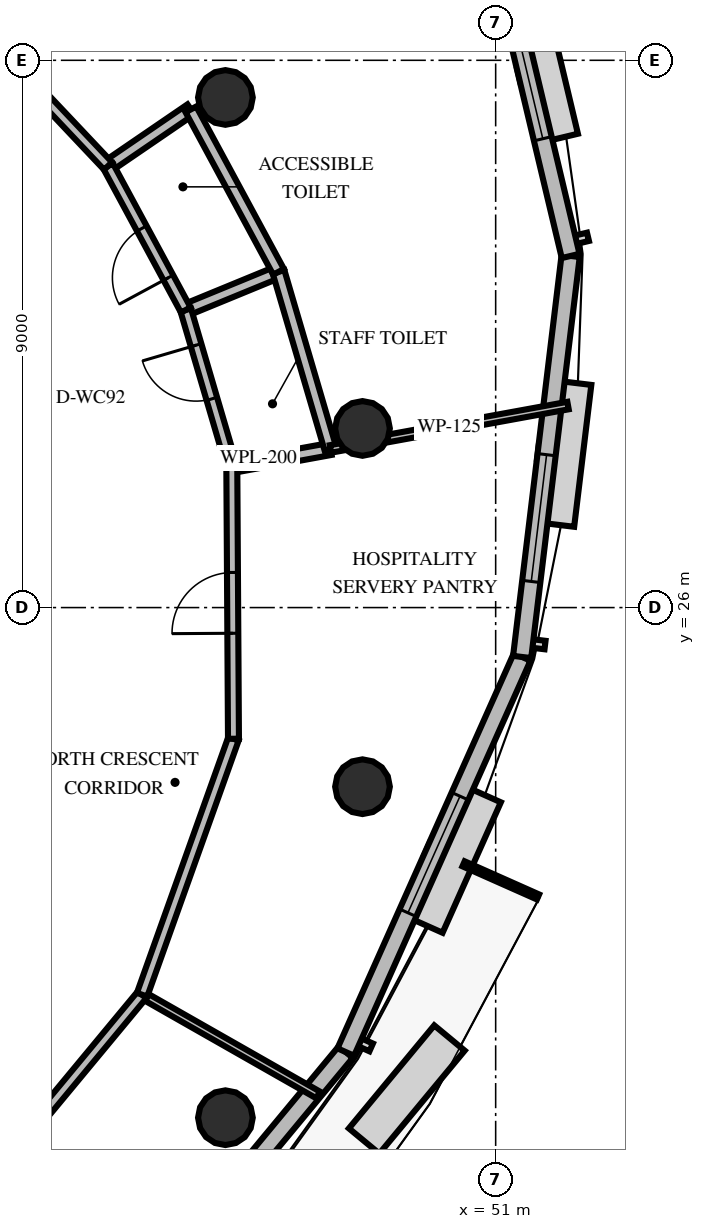
"""IFC4 building model, lengths in metres.
Left out: names, types, materials, properties, quantities, classifications, styles, units other than length and angle.
Written with IfcOpenShell. Run it as: python <this file> out.ifc"""

import sys

from ifc_helpers import new_model, si_unit, direction, frame, frame_2d, origin, origin_2d, place, context, subcontext, project, spatial, rectangle, circle, extrude, element, fill, save


model = new_model("IFC4")
c1 = context("Model", 3, precision=1e-05, world=origin(), true_north=direction((0.0, 1.0)))
c2 = subcontext(c1, "Body", "Model", "MODEL_VIEW")
j1 = project(units=[si_unit("LENGTHUNIT", "METRE"), si_unit("PLANEANGLEUNIT", "RADIAN")], contexts=[c1])
p1 = place(None, origin())
s1 = spatial("IfcSite", under=j1, at=p1, CompositionType="ELEMENT")
p2 = place(p1, origin())
s2 = spatial("IfcBuilding", under=s1, at=p2, CompositionType="ELEMENT")
p3 = place(p2, frame((0.0, 0.0, 241.2)))
s3 = spatial("IfcBuildingStorey", under=s2, at=p3, CompositionType="ELEMENT", Elevation=241.2)
for number, where, z_axis, x_axis in (
    (1, (48.81, 28.946, 0.0), (0.0, 0.0, 1.0), (1.0, 0.0, 0.0)),
    (2, (46.555, 34.389, 0.0), (0.0, 0.0, 1.0), (1.0, 0.0, 0.0)),
    (3, (46.555, 17.611, 0.0), (0.0, 0.0, 1.0), (1.0, 0.0, 0.0)),
    (4, (48.81, 23.054, 0.0), (0.0, 0.0, 1.0), (1.0, 0.0, 0.0)),
):
    element("IfcColumn", number, at=place(p3, frame(where, z_axis=z_axis, x_axis=x_axis)), inside=s3, PredefinedType="COLUMN", context=c2, shape_type="SweptSolid", body=[
        extrude(circle(Radius=0.45, at=origin_2d()), origin(), (0.0, 0.0, 1.0), 3.6),
    ])
p4 = place(p3, frame((43.881, 13.075, 0.0), z_axis=(0.0, 0.0, 1.0), x_axis=(0.638097821835, 0.769955303748, 0.0)))
e5 = element("IfcWall", 5, at=p4, inside=s3, PredefinedType="SOLIDWALL", context=c2, shape_type="SweptSolid", body=[
    extrude(rectangle(XDim=7.293, YDim=0.3, at=frame_2d((3.646, 0.0))), origin(), (0.0, 0.0, 1.0), 2.76),
])
p5 = place(p4, frame((1.63, 0.0, 0.0)))
e6 = element("IfcOpeningElement", 6, at=p5, cuts=e5, PredefinedType="OPENING", context=c2, shape_type="SweptSolid", body=[
    extrude(rectangle(XDim=1.05, YDim=2.15, at=frame_2d((0.525, 1.075))), frame((0.0, 0.16, 0.0), z_axis=(0.0, -1.0, 0.0), x_axis=(1.0, 0.0, 0.0)), (0.0, 0.0, 1.0), 0.32),
])
p6 = place(p3, frame((48.535, 18.69, 0.0), z_axis=(0.0, 0.0, 1.0), x_axis=(0.407669232849, 0.913129671289, 0.0)))
e7 = element("IfcWall", 7, at=p6, inside=s3, PredefinedType="SOLIDWALL", context=c2, shape_type="SweptSolid", body=[
    extrude(rectangle(XDim=7.115, YDim=0.3, at=frame_2d((3.558, 0.0))), origin(), (0.0, 0.0, 1.0), 2.76),
])
p7 = place(p6, frame((2.508, 0.0, 0.8)))
e8 = element("IfcOpeningElement", 8, at=p7, cuts=e7, PredefinedType="OPENING", context=c2, shape_type="SweptSolid", body=[
    extrude(rectangle(XDim=2.1, YDim=1.85, at=frame_2d((1.05, 0.925))), frame((0.0, 0.16, 0.0), z_axis=(0.0, -1.0, 0.0), x_axis=(1.0, 0.0, 0.0)), (0.0, 0.0, 1.0), 0.32),
])
p8 = place(p3, frame((51.436, 25.188, 0.0), z_axis=(0.0, 0.0, 1.0), x_axis=(0.120062472336, 0.992766338439, 0.0)))
e9 = element("IfcWall", 9, at=p8, inside=s3, PredefinedType="SOLIDWALL", context=c2, shape_type="SweptSolid", body=[
    extrude(rectangle(XDim=6.643, YDim=0.3, at=frame_2d((3.322, 0.0))), origin(), (0.0, 0.0, 1.0), 2.76),
])
p9 = place(p8, frame((1.251, 0.0, 0.8)))
e10 = element("IfcOpeningElement", 10, at=p9, cuts=e9, PredefinedType="OPENING", context=c2, shape_type="SweptSolid", body=[
    extrude(rectangle(XDim=2.1, YDim=1.85, at=frame_2d((1.05, 0.925))), frame((0.0, 0.16, 0.0), z_axis=(0.0, -1.0, 0.0), x_axis=(1.0, 0.0, 0.0)), (0.0, 0.0, 1.0), 0.32),
])
p10 = place(p3, frame((52.233, 31.783, 0.0), z_axis=(0.0, 0.0, 1.0), x_axis=(-0.23117584111, 0.972911984964, 0.0)))
e11 = element("IfcWall", 11, at=p10, inside=s3, PredefinedType="SOLIDWALL", context=c2, shape_type="SweptSolid", body=[
    extrude(rectangle(XDim=6.062, YDim=0.3, at=frame_2d((3.031, 0.0))), origin(), (0.0, 0.0, 1.0), 2.76),
])
p11 = place(p10, frame((1.981, 0.0, 0.8)))
e12 = element("IfcOpeningElement", 12, at=p11, cuts=e11, PredefinedType="OPENING", context=c2, shape_type="SweptSolid", body=[
    extrude(rectangle(XDim=2.1, YDim=1.85, at=frame_2d((1.05, 0.925))), frame((0.0, 0.16, 0.0), z_axis=(0.0, -1.0, 0.0), x_axis=(1.0, 0.0, 0.0)), (0.0, 0.0, 1.0), 0.32),
])
for number, where, z_axis, x_axis in (
    (13, (46.661, 28.312, 0.0), (0.0, 0.0, 1.0), (0.984, 0.18, 0.0)),
    (14, (45.903, 30.894, 0.0), (0.0, 0.0, 1.0), (0.925, 0.38, 0.0)),
):
    element("IfcWall", number, at=place(p3, frame(where, z_axis=z_axis, x_axis=x_axis)), inside=s3, PredefinedType="PLUMBINGWALL", context=c2, shape_type="SweptSolid", body=[
        extrude(rectangle(XDim=1.65, YDim=0.2, at=frame_2d((0.825, 0.0))), origin(), (0.0, 0.0, 1.0), 2.46),
    ])
p12 = place(p3, frame((48.284, 28.609, 0.0), z_axis=(0.0, 0.0, 1.0), x_axis=(-0.281491340898, 0.959563768073, 0.0)))
e15 = element("IfcWall", 15, at=p12, inside=s3, PredefinedType="PLUMBINGWALL", context=c2, shape_type="SweptSolid", body=[
    extrude(rectangle(XDim=3.036, YDim=0.2, at=frame_2d((1.518, 0.0))), origin(), (0.0, 0.0, 1.0), 2.46),
])
p13 = place(p3, frame((46.661, 28.312, 0.0), z_axis=(0.0, 0.0, 1.0), x_axis=(-0.281473567951, 0.95956898165, 0.0)))
e16 = element("IfcWall", 16, at=p13, inside=s3, PredefinedType="PARTITIONING", context=c2, shape_type="SweptSolid", body=[
    extrude(rectangle(XDim=2.691, YDim=0.18, at=frame_2d((1.345, 0.0))), origin(), (0.0, 0.0, 1.0), 2.46),
])
p14 = place(p13, frame((1.167, 0.0, 0.0)))
e17 = element("IfcOpeningElement", 17, at=p14, cuts=e16, PredefinedType="OPENING", context=c2, shape_type="SweptSolid", body=[
    extrude(rectangle(XDim=0.92, YDim=2.1, at=frame_2d((0.46, 1.05))), frame((0.0, 0.1, 0.0), z_axis=(0.0, -1.0, 0.0), x_axis=(1.0, 0.0, 0.0)), (0.0, 0.0, 1.0), 0.2),
])
p15 = place(p3, frame((44.625, 33.262, 0.0), z_axis=(0.0, 0.0, 1.0), x_axis=(0.825644641501, 0.564190505026, 0.0)))
e18 = element("IfcWall", 18, at=p15, inside=s3, PredefinedType="PLUMBINGWALL", context=c2, shape_type="SweptSolid", body=[
    extrude(rectangle(XDim=1.65, YDim=0.2, at=frame_2d((0.825, 0.0))), origin(), (0.0, 0.0, 1.0), 2.46),
])
p16 = place(p3, frame((47.429, 31.521, 0.0), z_axis=(0.0, 0.0, 1.0), x_axis=(-0.474857458355, 0.880062721768, 0.0)))
e19 = element("IfcWall", 19, at=p16, inside=s3, PredefinedType="PLUMBINGWALL", context=c2, shape_type="SweptSolid", body=[
    extrude(rectangle(XDim=3.035, YDim=0.2, at=frame_2d((1.518, 0.0))), origin(), (0.0, 0.0, 1.0), 2.46),
])
p17 = place(p3, frame((45.903, 30.894, 0.0), z_axis=(0.0, 0.0, 1.0), x_axis=(-0.474905831931, 0.88003661901, 0.0)))
e20 = element("IfcWall", 20, at=p17, inside=s3, PredefinedType="PARTITIONING", context=c2, shape_type="SweptSolid", body=[
    extrude(rectangle(XDim=2.691, YDim=0.18, at=frame_2d((1.345, 0.0))), origin(), (0.0, 0.0, 1.0), 2.46),
])
p18 = place(p17, frame((0.603, 0.0, 0.0)))
e21 = element("IfcOpeningElement", 21, at=p18, cuts=e20, PredefinedType="OPENING", context=c2, shape_type="SweptSolid", body=[
    extrude(rectangle(XDim=0.92, YDim=2.1, at=frame_2d((0.46, 1.05))), frame((0.0, 0.1, 0.0), z_axis=(0.0, -1.0, 0.0), x_axis=(1.0, 0.0, 0.0)), (0.0, 0.0, 1.0), 0.2),
])
p19 = place(p3, frame((48.284, 28.609, 0.0), z_axis=(0.0, 0.0, 1.0), x_axis=(0.98373190469, 0.179642811418, 0.0)))
e22 = element("IfcWall", 22, at=p19, inside=s3, PredefinedType="PARTITIONING", context=c2, shape_type="SweptSolid", body=[
    extrude(rectangle(XDim=3.971, YDim=0.125, at=frame_2d((1.986, 0.0))), origin(), (0.0, 0.0, 1.0), 2.46),
])
p20 = place(p3, frame((44.625, 33.262, 0.0), z_axis=(0.0, 0.0, 1.0), x_axis=(-0.686440124719, 0.727186327688, 0.0)))
e23 = element("IfcWall", 23, at=p20, inside=s3, PredefinedType="PARTITIONING", context=c2, shape_type="SweptSolid", body=[
    extrude(rectangle(XDim=4.026, YDim=0.18, at=frame_2d((2.013, 0.0))), origin(), (0.0, 0.0, 1.0), 2.46),
])
p21 = place(p20, frame((2.195, 0.0, 0.0)))
e24 = element("IfcOpeningElement", 24, at=p21, cuts=e23, PredefinedType="OPENING", context=c2, shape_type="SweptSolid", body=[
    extrude(rectangle(XDim=1.0, YDim=2.15, at=frame_2d((0.5, 1.075))), frame((0.0, 0.1, 0.0), z_axis=(0.0, -1.0, 0.0), x_axis=(1.0, 0.0, 0.0)), (0.0, 0.0, 1.0), 0.2),
])
p22 = place(p3, frame((45.185, 19.633, 0.0), z_axis=(0.0, 0.0, 1.0), x_axis=(0.86904485461, -0.494733302574, 0.0)))
e25 = element("IfcWall", 25, at=p22, inside=s3, PredefinedType="PARTITIONING", context=c2, shape_type="SweptSolid", body=[
    extrude(rectangle(XDim=3.331, YDim=0.125, at=frame_2d((1.666, 0.0))), origin(), (0.0, 0.0, 1.0), 2.46),
])
p23 = place(p3, frame((42.333, 16.192, 0.0), z_axis=(0.0, 0.0, 1.0), x_axis=(0.638070606168, 0.769977857828, 0.0)))
e26 = element("IfcWall", 26, at=p23, inside=s3, PredefinedType="PARTITIONING", context=c2, shape_type="SweptSolid", body=[
    extrude(rectangle(XDim=4.47, YDim=0.18, at=frame_2d((2.235, 0.0))), origin(), (0.0, 0.0, 1.0), 2.46),
])
p24 = place(p3, frame((45.185, 19.633, 0.0), z_axis=(0.0, 0.0, 1.0), x_axis=(0.336312175041, 0.941750561943, 0.0)))
e27 = element("IfcWall", 27, at=p24, inside=s3, PredefinedType="PARTITIONING", context=c2, shape_type="SweptSolid", body=[
    extrude(rectangle(XDim=4.469, YDim=0.18, at=frame_2d((2.235, 0.0))), origin(), (0.0, 0.0, 1.0), 2.46),
])
p25 = place(p3, frame((46.688, 23.843, 0.0), z_axis=(0.0, 0.0, 1.0), x_axis=(-0.006117429774, 0.999981288351, 0.0)))
e28 = element("IfcWall", 28, at=p25, inside=s3, PredefinedType="PARTITIONING", context=c2, shape_type="SweptSolid", body=[
    extrude(rectangle(XDim=4.47, YDim=0.18, at=frame_2d((2.235, 0.0))), origin(), (0.0, 0.0, 1.0), 2.46),
])
p26 = place(p25, frame((1.735, 0.0, 0.0)))
e29 = element("IfcOpeningElement", 29, at=p26, cuts=e28, PredefinedType="OPENING", context=c2, shape_type="SweptSolid", body=[
    extrude(rectangle(XDim=1.0, YDim=2.15, at=frame_2d((0.5, 1.075))), frame((0.0, 0.1, 0.0), z_axis=(0.0, -1.0, 0.0), x_axis=(1.0, 0.0, 0.0)), (0.0, 0.0, 1.0), 0.2),
])
p27 = place(p7, origin())
e30 = element("IfcWindow", 30, at=p27, inside=s3, PartitioningType="SINGLE_PANEL", PredefinedType="WINDOW", context=c2, shape_type="SweptSolid", body=[
    extrude(rectangle(XDim=2.1, YDim=1.85, at=frame_2d((1.05, 0.925))), frame((0.0, 0.03, 0.0), z_axis=(0.0, -1.0, 0.0), x_axis=(1.0, 0.0, 0.0)), (0.0, 0.0, 1.0), 0.06),
])
fill(e8, e30)
p28 = place(p9, origin())
e31 = element("IfcWindow", 31, at=p28, inside=s3, PartitioningType="SINGLE_PANEL", PredefinedType="WINDOW", context=c2, shape_type="SweptSolid", body=[
    extrude(rectangle(XDim=2.1, YDim=1.85, at=frame_2d((1.05, 0.925))), frame((0.0, 0.03, 0.0), z_axis=(0.0, -1.0, 0.0), x_axis=(1.0, 0.0, 0.0)), (0.0, 0.0, 1.0), 0.06),
])
fill(e10, e31)
p29 = place(p11, origin())
e32 = element("IfcWindow", 32, at=p29, inside=s3, PartitioningType="SINGLE_PANEL", PredefinedType="WINDOW", context=c2, shape_type="SweptSolid", body=[
    extrude(rectangle(XDim=2.1, YDim=1.85, at=frame_2d((1.05, 0.925))), frame((0.0, 0.03, 0.0), z_axis=(0.0, -1.0, 0.0), x_axis=(1.0, 0.0, 0.0)), (0.0, 0.0, 1.0), 0.06),
])
fill(e12, e32)
p30 = place(p14, origin())
e33 = element("IfcDoor", 33, at=p30, inside=s3, OperationType="SINGLE_SWING_RIGHT", PredefinedType="DOOR", context=c2, shape_type="SweptSolid", body=[
    extrude(rectangle(XDim=0.92, YDim=2.1, at=frame_2d((0.46, 1.05))), frame((0.0, 0.025, 0.0), z_axis=(0.0, -1.0, 0.0), x_axis=(1.0, 0.0, 0.0)), (0.0, 0.0, 1.0), 0.05),
])
fill(e17, e33)
p31 = place(p18, origin())
e34 = element("IfcDoor", 34, at=p31, inside=s3, OperationType="SINGLE_SWING_LEFT", PredefinedType="DOOR", context=c2, shape_type="SweptSolid", body=[
    extrude(rectangle(XDim=0.92, YDim=2.1, at=frame_2d((0.46, 1.05))), frame((0.0, 0.025, 0.0), z_axis=(0.0, -1.0, 0.0), x_axis=(1.0, 0.0, 0.0)), (0.0, 0.0, 1.0), 0.05),
])
fill(e21, e34)
p32 = place(p26, origin())
e35 = element("IfcDoor", 35, at=p32, inside=s3, OperationType="SINGLE_SWING_LEFT", PredefinedType="DOOR", context=c2, shape_type="SweptSolid", body=[
    extrude(rectangle(XDim=1.0, YDim=2.15, at=frame_2d((0.5, 1.075))), frame((0.0, 0.025, 0.0), z_axis=(0.0, -1.0, 0.0), x_axis=(1.0, 0.0, 0.0)), (0.0, 0.0, 1.0), 0.05),
])
fill(e29, e35)
save(model, sys.argv[1])
